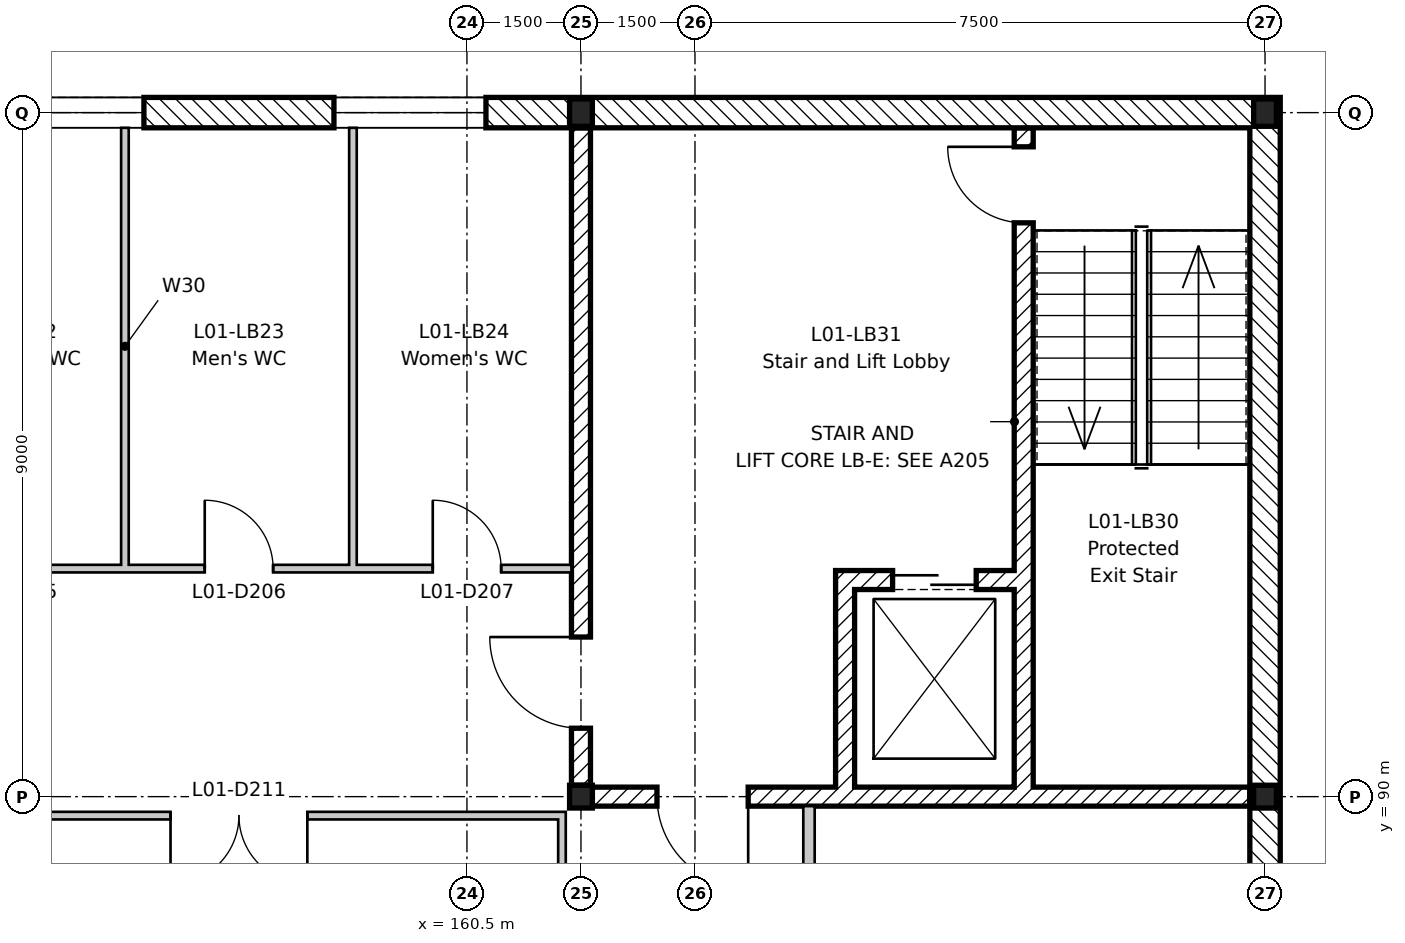
"""IFC4 building model, lengths in metres.
Left out: names, types, materials, properties, quantities, classifications, styles, units other than length and angle.
Written with IfcOpenShell. Run it as: python <this file> out.ifc"""

import sys

from ifc_helpers import new_model, si_unit, direction, frame, frame_2d, origin, origin_2d, place, context, subcontext, project, spatial, rectangle, i_section, extrude, element, fill, save


model = new_model("IFC4")
c1 = context("Model", 3, precision=1e-05, world=origin(), true_north=direction((0.0, 1.0)))
c2 = subcontext(c1, "Body", "Model", "MODEL_VIEW")
j1 = project(units=[si_unit("LENGTHUNIT", "METRE"), si_unit("PLANEANGLEUNIT", "RADIAN")], contexts=[c1])
p1 = place(None, origin())
s1 = spatial("IfcSite", under=j1, at=p1, CompositionType="ELEMENT")
p2 = place(p1, origin())
s2 = spatial("IfcBuilding", under=s1, at=p2, CompositionType="ELEMENT")
p3 = place(p2, frame((0.0, 0.0, 5.4)))
s3 = spatial("IfcBuildingStorey", under=s2, at=p3, CompositionType="ELEMENT", Elevation=5.4)
p4 = place(p3, frame((162.0, 90.0, -0.2), z_axis=(0.0, 0.0, 1.0), x_axis=(1.0, 0.0, 0.0)))
e1 = element("IfcColumn", 1, at=p4, inside=s3, PredefinedType="COLUMN", context=c2, shape_type="SweptSolid", body=[
    extrude(i_section(OverallWidth=0.3, OverallDepth=0.3, WebThickness=0.011, FlangeThickness=0.019, FilletRadius=0.027, at=origin_2d()), origin(), (0.0, 0.0, 1.0), 4.5),
])
p5 = place(p3, frame((162.0, 99.0, -0.2), z_axis=(0.0, 0.0, 1.0), x_axis=(1.0, 0.0, 0.0)))
e2 = element("IfcColumn", 2, at=p5, inside=s3, PredefinedType="COLUMN", context=c2, shape_type="SweptSolid", body=[
    extrude(i_section(OverallWidth=0.3, OverallDepth=0.36, WebThickness=0.012, FlangeThickness=0.022, FilletRadius=0.027, at=origin_2d()), origin(), (0.0, 0.0, 1.0), 4.5),
])
p6 = place(p3, frame((171.0, 90.0, -0.2), z_axis=(0.0, 0.0, 1.0), x_axis=(1.0, 0.0, 0.0)))
e3 = element("IfcColumn", 3, at=p6, inside=s3, PredefinedType="COLUMN", context=c2, shape_type="SweptSolid", body=[
    extrude(i_section(OverallWidth=0.3, OverallDepth=0.3, WebThickness=0.011, FlangeThickness=0.019, FilletRadius=0.027, at=origin_2d()), origin(), (0.0, 0.0, 1.0), 4.5),
])
p7 = place(p3, frame((171.0, 99.0, -0.2), z_axis=(0.0, 0.0, 1.0), x_axis=(1.0, 0.0, 0.0)))
e4 = element("IfcColumn", 4, at=p7, inside=s3, PredefinedType="COLUMN", context=c2, shape_type="SweptSolid", body=[
    extrude(i_section(OverallWidth=0.3, OverallDepth=0.36, WebThickness=0.012, FlangeThickness=0.022, FilletRadius=0.027, at=origin_2d()), origin(), (0.0, 0.0, 1.0), 4.5),
])
p8 = place(p3, frame((167.825, 98.8, 0.0), z_axis=(0.0, 0.0, 1.0), x_axis=(0.0, -1.0, 0.0)))
e5 = element("IfcWall", 5, at=p8, inside=s3, PredefinedType="SHEAR", context=c2, shape_type="SweptSolid", body=[
    extrude(rectangle(XDim=8.675, YDim=0.25, at=frame_2d((4.337, 0.0))), origin(), (0.0, 0.0, 1.0), 4.3),
])
p9 = place(p8, frame((0.25, 0.0, 0.0)))
e6 = element("IfcOpeningElement", 6, at=p9, cuts=e5, PredefinedType="OPENING", context=c2, shape_type="SweptSolid", body=[
    extrude(rectangle(XDim=1.0, YDim=2.1, at=frame_2d((0.5, 1.05))), frame((0.0, 0.135, 0.0), z_axis=(0.0, -1.0, 0.0), x_axis=(1.0, 0.0, 0.0)), (0.0, 0.0, 1.0), 0.27),
])
p10 = place(p3, frame((162.0, 98.8, 0.0), z_axis=(0.0, 0.0, 1.0), x_axis=(0.0, -1.0, 0.0)))
e7 = element("IfcWall", 7, at=p10, inside=s3, PredefinedType="SHEAR", context=c2, shape_type="SweptSolid", body=[
    extrude(rectangle(XDim=8.65, YDim=0.25, at=frame_2d((4.325, 0.0))), origin(), (0.0, 0.0, 1.0), 4.3),
])
p11 = place(p10, frame((6.7, 0.0, 0.0)))
e8 = element("IfcOpeningElement", 8, at=p11, cuts=e7, PredefinedType="OPENING", context=c2, shape_type="SweptSolid", body=[
    extrude(rectangle(XDim=1.2, YDim=2.1, at=frame_2d((0.6, 1.05))), frame((0.0, 0.135, 0.0), z_axis=(0.0, -1.0, 0.0), x_axis=(1.0, 0.0, 0.0)), (0.0, 0.0, 1.0), 0.27),
])
p12 = place(p3, frame((170.8, 90.0, 0.0), z_axis=(0.0, 0.0, 1.0), x_axis=(-1.0, 0.0, 0.0)))
e9 = element("IfcWall", 9, at=p12, inside=s3, PredefinedType="SHEAR", context=c2, shape_type="SweptSolid", body=[
    extrude(rectangle(XDim=8.65, YDim=0.25, at=frame_2d((4.325, 0.0))), origin(), (0.0, 0.0, 1.0), 4.3),
])
p13 = place(p12, frame((6.6, 0.0, 0.0)))
e10 = element("IfcOpeningElement", 10, at=p13, cuts=e9, PredefinedType="OPENING", context=c2, shape_type="SweptSolid", body=[
    extrude(rectangle(XDim=1.2, YDim=2.1, at=frame_2d((0.6, 1.05))), frame((0.0, 0.135, 0.0), z_axis=(0.0, -1.0, 0.0), x_axis=(1.0, 0.0, 0.0)), (0.0, 0.0, 1.0), 0.27),
])
p14 = place(p3, frame((167.7, 92.85, 0.0), z_axis=(0.0, 0.0, 1.0), x_axis=(-1.0, 0.0, 0.0)))
e11 = element("IfcWall", 11, at=p14, inside=s3, PredefinedType="SHEAR", context=c2, shape_type="SweptSolid", body=[
    extrude(rectangle(XDim=2.35, YDim=0.25, at=frame_2d((1.175, 0.0))), origin(), (0.0, 0.0, 1.0), 4.3),
])
p15 = place(p14, frame((0.5, 0.0, 0.0)))
e12 = element("IfcOpeningElement", 12, at=p15, cuts=e11, PredefinedType="OPENING", context=c2, shape_type="SweptSolid", body=[
    extrude(rectangle(XDim=1.1, YDim=2.1, at=frame_2d((0.55, 1.05))), frame((0.0, 0.135, 0.0), z_axis=(0.0, -1.0, 0.0), x_axis=(1.0, 0.0, 0.0)), (0.0, 0.0, 1.0), 0.27),
])
p16 = place(p3, frame((165.475, 92.725, 0.0), z_axis=(0.0, 0.0, 1.0), x_axis=(0.0, -1.0, 0.0)))
e13 = element("IfcWall", 13, at=p16, inside=s3, PredefinedType="SHEAR", context=c2, shape_type="SweptSolid", body=[
    extrude(rectangle(XDim=2.6, YDim=0.25, at=frame_2d((1.3, 0.0))), origin(), (0.0, 0.0, 1.0), 4.3),
])
p17 = place(p3, frame((116.8, 99.0, 0.0), z_axis=(0.0, 0.0, 1.0), x_axis=(1.0, 0.0, 0.0)))
e14 = element("IfcWall", 14, at=p17, inside=s3, PredefinedType="STANDARD", context=c2, shape_type="SweptSolid", body=[
    extrude(rectangle(XDim=54.4, YDim=0.4, at=frame_2d((27.2, 0.0))), origin(), (0.0, 0.0, 1.0), 4.3),
])
p18 = place(p17, frame((1.45, 0.0, 0.5)))
e15 = element("IfcOpeningElement", 15, at=p18, cuts=e14, PredefinedType="OPENING", context=c2, shape_type="SweptSolid", body=[
    extrude(rectangle(XDim=2.0, YDim=3.2, at=frame_2d((1.0, 1.6))), frame((0.0, 0.21, 0.0), z_axis=(0.0, -1.0, 0.0), x_axis=(1.0, 0.0, 0.0)), (0.0, 0.0, 1.0), 0.42),
])
p19 = place(p17, frame((5.95, 0.0, 0.5)))
e16 = element("IfcOpeningElement", 16, at=p19, cuts=e14, PredefinedType="OPENING", context=c2, shape_type="SweptSolid", body=[
    extrude(rectangle(XDim=2.0, YDim=3.2, at=frame_2d((1.0, 1.6))), frame((0.0, 0.21, 0.0), z_axis=(0.0, -1.0, 0.0), x_axis=(1.0, 0.0, 0.0)), (0.0, 0.0, 1.0), 0.42),
])
p20 = place(p17, frame((10.45, 0.0, 0.5)))
e17 = element("IfcOpeningElement", 17, at=p20, cuts=e14, PredefinedType="OPENING", context=c2, shape_type="SweptSolid", body=[
    extrude(rectangle(XDim=2.0, YDim=3.2, at=frame_2d((1.0, 1.6))), frame((0.0, 0.21, 0.0), z_axis=(0.0, -1.0, 0.0), x_axis=(1.0, 0.0, 0.0)), (0.0, 0.0, 1.0), 0.42),
])
p21 = place(p17, frame((14.95, 0.0, 0.5)))
e18 = element("IfcOpeningElement", 18, at=p21, cuts=e14, PredefinedType="OPENING", context=c2, shape_type="SweptSolid", body=[
    extrude(rectangle(XDim=2.0, YDim=3.2, at=frame_2d((1.0, 1.6))), frame((0.0, 0.21, 0.0), z_axis=(0.0, -1.0, 0.0), x_axis=(1.0, 0.0, 0.0)), (0.0, 0.0, 1.0), 0.42),
])
p22 = place(p17, frame((28.45, 0.0, 0.5)))
e19 = element("IfcOpeningElement", 19, at=p22, cuts=e14, PredefinedType="OPENING", context=c2, shape_type="SweptSolid", body=[
    extrude(rectangle(XDim=2.0, YDim=3.2, at=frame_2d((1.0, 1.6))), frame((0.0, 0.21, 0.0), z_axis=(0.0, -1.0, 0.0), x_axis=(1.0, 0.0, 0.0)), (0.0, 0.0, 1.0), 0.42),
])
p23 = place(p17, frame((32.95, 0.0, 0.5)))
e20 = element("IfcOpeningElement", 20, at=p23, cuts=e14, PredefinedType="OPENING", context=c2, shape_type="SweptSolid", body=[
    extrude(rectangle(XDim=2.0, YDim=3.2, at=frame_2d((1.0, 1.6))), frame((0.0, 0.21, 0.0), z_axis=(0.0, -1.0, 0.0), x_axis=(1.0, 0.0, 0.0)), (0.0, 0.0, 1.0), 0.42),
])
p24 = place(p17, frame((37.45, 0.0, 0.5)))
e21 = element("IfcOpeningElement", 21, at=p24, cuts=e14, PredefinedType="OPENING", context=c2, shape_type="SweptSolid", body=[
    extrude(rectangle(XDim=2.0, YDim=3.2, at=frame_2d((1.0, 1.6))), frame((0.0, 0.21, 0.0), z_axis=(0.0, -1.0, 0.0), x_axis=(1.0, 0.0, 0.0)), (0.0, 0.0, 1.0), 0.42),
])
p25 = place(p17, frame((41.95, 0.0, 0.5)))
e22 = element("IfcOpeningElement", 22, at=p25, cuts=e14, PredefinedType="OPENING", context=c2, shape_type="SweptSolid", body=[
    extrude(rectangle(XDim=2.0, YDim=3.2, at=frame_2d((1.0, 1.6))), frame((0.0, 0.21, 0.0), z_axis=(0.0, -1.0, 0.0), x_axis=(1.0, 0.0, 0.0)), (0.0, 0.0, 1.0), 0.42),
])
p26 = place(p17, frame((19.55, 0.0, 0.0)))
e23 = element("IfcOpeningElement", 23, at=p26, cuts=e14, PredefinedType="OPENING", context=c2, shape_type="SweptSolid", body=[
    extrude(rectangle(XDim=1.8, YDim=2.4, at=frame_2d((0.9, 1.2))), frame((0.0, 0.21, 0.0), z_axis=(0.0, -1.0, 0.0), x_axis=(1.0, 0.0, 0.0)), (0.0, 0.0, 1.0), 0.42),
])
p27 = place(p17, frame((24.05, 0.0, 0.0)))
e24 = element("IfcOpeningElement", 24, at=p27, cuts=e14, PredefinedType="OPENING", context=c2, shape_type="SweptSolid", body=[
    extrude(rectangle(XDim=1.8, YDim=2.4, at=frame_2d((0.9, 1.2))), frame((0.0, 0.21, 0.0), z_axis=(0.0, -1.0, 0.0), x_axis=(1.0, 0.0, 0.0)), (0.0, 0.0, 1.0), 0.42),
])
p28 = place(p3, frame((171.0, 63.2, 0.0), z_axis=(0.0, 0.0, 1.0), x_axis=(0.0, 1.0, 0.0)))
e25 = element("IfcWall", 25, at=p28, inside=s3, PredefinedType="STANDARD", context=c2, shape_type="SweptSolid", body=[
    extrude(rectangle(XDim=35.6, YDim=0.4, at=frame_2d((17.8, 0.0))), origin(), (0.0, 0.0, 1.0), 4.3),
])
p29 = place(p28, frame((1.05, 0.0, 0.5)))
e26 = element("IfcOpeningElement", 26, at=p29, cuts=e25, PredefinedType="OPENING", context=c2, shape_type="SweptSolid", body=[
    extrude(rectangle(XDim=2.0, YDim=3.2, at=frame_2d((1.0, 1.6))), frame((0.0, 0.21, 0.0), z_axis=(0.0, -1.0, 0.0), x_axis=(1.0, 0.0, 0.0)), (0.0, 0.0, 1.0), 0.42),
])
p30 = place(p28, frame((5.55, 0.0, 0.5)))
e27 = element("IfcOpeningElement", 27, at=p30, cuts=e25, PredefinedType="OPENING", context=c2, shape_type="SweptSolid", body=[
    extrude(rectangle(XDim=2.0, YDim=3.2, at=frame_2d((1.0, 1.6))), frame((0.0, 0.21, 0.0), z_axis=(0.0, -1.0, 0.0), x_axis=(1.0, 0.0, 0.0)), (0.0, 0.0, 1.0), 0.42),
])
p31 = place(p28, frame((19.05, 0.0, 0.5)))
e28 = element("IfcOpeningElement", 28, at=p31, cuts=e25, PredefinedType="OPENING", context=c2, shape_type="SweptSolid", body=[
    extrude(rectangle(XDim=2.0, YDim=3.2, at=frame_2d((1.0, 1.6))), frame((0.0, 0.21, 0.0), z_axis=(0.0, -1.0, 0.0), x_axis=(1.0, 0.0, 0.0)), (0.0, 0.0, 1.0), 0.42),
])
p32 = place(p28, frame((23.55, 0.0, 0.5)))
e29 = element("IfcOpeningElement", 29, at=p32, cuts=e25, PredefinedType="OPENING", context=c2, shape_type="SweptSolid", body=[
    extrude(rectangle(XDim=2.0, YDim=3.2, at=frame_2d((1.0, 1.6))), frame((0.0, 0.21, 0.0), z_axis=(0.0, -1.0, 0.0), x_axis=(1.0, 0.0, 0.0)), (0.0, 0.0, 1.0), 0.42),
])
p33 = place(p28, frame((10.15, 0.0, 0.0)))
e30 = element("IfcOpeningElement", 30, at=p33, cuts=e25, PredefinedType="OPENING", context=c2, shape_type="SweptSolid", body=[
    extrude(rectangle(XDim=1.8, YDim=2.4, at=frame_2d((0.9, 1.2))), frame((0.0, 0.21, 0.0), z_axis=(0.0, -1.0, 0.0), x_axis=(1.0, 0.0, 0.0)), (0.0, 0.0, 1.0), 0.42),
])
p34 = place(p28, frame((14.65, 0.0, 0.0)))
e31 = element("IfcOpeningElement", 31, at=p34, cuts=e25, PredefinedType="OPENING", context=c2, shape_type="SweptSolid", body=[
    extrude(rectangle(XDim=1.8, YDim=2.4, at=frame_2d((0.9, 1.2))), frame((0.0, 0.21, 0.0), z_axis=(0.0, -1.0, 0.0), x_axis=(1.0, 0.0, 0.0)), (0.0, 0.0, 1.0), 0.42),
])
p35 = place(p3, frame((147.0, 93.0, 0.0), z_axis=(0.0, 0.0, 1.0), x_axis=(1.0, 0.0, 0.0)))
e32 = element("IfcWall", 32, at=p35, inside=s3, PredefinedType="PARTITIONING", context=c2, shape_type="SweptSolid", body=[
    extrude(rectangle(XDim=14.875, YDim=0.1, at=frame_2d((7.438, 0.0))), origin(), (0.0, 0.0, 1.0), 3.78),
])
p36 = place(p35, frame((2.5, 0.0, 0.0)))
e33 = element("IfcOpeningElement", 33, at=p36, cuts=e32, PredefinedType="OPENING", context=c2, shape_type="SweptSolid", body=[
    extrude(rectangle(XDim=1.0, YDim=2.1, at=frame_2d((0.5, 1.05))), frame((0.0, 0.06, 0.0), z_axis=(0.0, -1.0, 0.0), x_axis=(1.0, 0.0, 0.0)), (0.0, 0.0, 1.0), 0.12),
])
p37 = place(p35, frame((7.0, 0.0, 0.0)))
e34 = element("IfcOpeningElement", 34, at=p37, cuts=e32, PredefinedType="OPENING", context=c2, shape_type="SweptSolid", body=[
    extrude(rectangle(XDim=1.0, YDim=2.1, at=frame_2d((0.5, 1.05))), frame((0.0, 0.06, 0.0), z_axis=(0.0, -1.0, 0.0), x_axis=(1.0, 0.0, 0.0)), (0.0, 0.0, 1.0), 0.12),
])
p38 = place(p35, frame((10.05, 0.0, 0.0)))
e35 = element("IfcOpeningElement", 35, at=p38, cuts=e32, PredefinedType="OPENING", context=c2, shape_type="SweptSolid", body=[
    extrude(rectangle(XDim=0.9, YDim=2.1, at=frame_2d((0.45, 1.05))), frame((0.0, 0.06, 0.0), z_axis=(0.0, -1.0, 0.0), x_axis=(1.0, 0.0, 0.0)), (0.0, 0.0, 1.0), 0.12),
])
p39 = place(p35, frame((13.05, 0.0, 0.0)))
e36 = element("IfcOpeningElement", 36, at=p39, cuts=e32, PredefinedType="OPENING", context=c2, shape_type="SweptSolid", body=[
    extrude(rectangle(XDim=0.9, YDim=2.1, at=frame_2d((0.45, 1.05))), frame((0.0, 0.06, 0.0), z_axis=(0.0, -1.0, 0.0), x_axis=(1.0, 0.0, 0.0)), (0.0, 0.0, 1.0), 0.12),
])
for number, where, z_axis, x_axis in (
    (37, (156.0, 93.05, 0.0), (0.0, 0.0, 1.0), (0.0, 1.0, 0.0)),
    (38, (159.0, 93.05, 0.0), (0.0, 0.0, 1.0), (0.0, 1.0, 0.0)),
):
    element("IfcWall", number, at=place(p3, frame(where, z_axis=z_axis, x_axis=x_axis)), inside=s3, PredefinedType="PARTITIONING", context=c2, shape_type="SweptSolid", body=[
        extrude(rectangle(XDim=5.75, YDim=0.1, at=frame_2d((2.875, 0.0))), origin(), (0.0, 0.0, 1.0), 3.78),
    ])
p40 = place(p3, frame((165.0, 69.075, 0.0), z_axis=(0.0, 0.0, 1.0), x_axis=(0.0, 1.0, 0.0)))
e39 = element("IfcWall", 39, at=p40, inside=s3, PredefinedType="PARTITIONING", context=c2, shape_type="SweptSolid", body=[
    extrude(rectangle(XDim=20.8, YDim=0.15, at=frame_2d((10.4, 0.0))), origin(), (0.0, 0.0, 1.0), 3.78),
])
p41 = place(p40, frame((0.825, 0.0, 0.0)))
e40 = element("IfcOpeningElement", 40, at=p41, cuts=e39, PredefinedType="OPENING", context=c2, shape_type="SweptSolid", body=[
    extrude(rectangle(XDim=1.2, YDim=2.1, at=frame_2d((0.6, 1.05))), frame((0.0, 0.085, 0.0), z_axis=(0.0, -1.0, 0.0), x_axis=(1.0, 0.0, 0.0)), (0.0, 0.0, 1.0), 0.17),
])
p42 = place(p40, frame((5.425, 0.0, 0.0)))
e41 = element("IfcOpeningElement", 41, at=p42, cuts=e39, PredefinedType="OPENING", context=c2, shape_type="SweptSolid", body=[
    extrude(rectangle(XDim=1.0, YDim=2.1, at=frame_2d((0.5, 1.05))), frame((0.0, 0.085, 0.0), z_axis=(0.0, -1.0, 0.0), x_axis=(1.0, 0.0, 0.0)), (0.0, 0.0, 1.0), 0.17),
])
p43 = place(p40, frame((14.325, 0.0, 0.0)))
e42 = element("IfcOpeningElement", 42, at=p43, cuts=e39, PredefinedType="OPENING", context=c2, shape_type="SweptSolid", body=[
    extrude(rectangle(XDim=1.2, YDim=2.1, at=frame_2d((0.6, 1.05))), frame((0.0, 0.085, 0.0), z_axis=(0.0, -1.0, 0.0), x_axis=(1.0, 0.0, 0.0)), (0.0, 0.0, 1.0), 0.17),
])
p44 = place(p3, frame((126.2, 89.75, 0.0), z_axis=(0.0, 0.0, 1.0), x_axis=(1.0, 0.0, 0.0)))
e43 = element("IfcWall", 43, at=p44, inside=s3, PredefinedType="PARTITIONING", context=c2, shape_type="SweptSolid", body=[
    extrude(rectangle(XDim=35.6, YDim=0.1, at=frame_2d((17.8, 0.0))), origin(), (0.0, 0.0, 1.0), 4.3),
])
p45 = place(p44, frame((21.4, 0.0, 0.0)))
e44 = element("IfcOpeningElement", 44, at=p45, cuts=e43, PredefinedType="OPENING", context=c2, shape_type="SweptSolid", body=[
    extrude(rectangle(XDim=1.8, YDim=2.1, at=frame_2d((0.9, 1.05))), frame((0.0, 0.06, 0.0), z_axis=(0.0, -1.0, 0.0), x_axis=(1.0, 0.0, 0.0)), (0.0, 0.0, 1.0), 0.12),
])
p46 = place(p44, frame((30.4, 0.0, 0.0)))
e45 = element("IfcOpeningElement", 45, at=p46, cuts=e43, PredefinedType="OPENING", context=c2, shape_type="SweptSolid", body=[
    extrude(rectangle(XDim=1.8, YDim=2.1, at=frame_2d((0.9, 1.05))), frame((0.0, 0.06, 0.0), z_axis=(0.0, -1.0, 0.0), x_axis=(1.0, 0.0, 0.0)), (0.0, 0.0, 1.0), 0.12),
])
p47 = place(p3, frame((161.75, 72.3, 0.0), z_axis=(0.0, 0.0, 1.0), x_axis=(0.0, 1.0, 0.0)))
e46 = element("IfcWall", 46, at=p47, inside=s3, PredefinedType="PARTITIONING", context=c2, shape_type="SweptSolid", body=[
    extrude(rectangle(XDim=17.4, YDim=0.1, at=frame_2d((8.7, 0.0))), origin(), (0.0, 0.0, 1.0), 4.3),
])
p48 = place(p47, frame((12.3, 0.0, 0.0)))
e47 = element("IfcOpeningElement", 47, at=p48, cuts=e46, PredefinedType="OPENING", context=c2, shape_type="SweptSolid", body=[
    extrude(rectangle(XDim=1.8, YDim=2.1, at=frame_2d((0.9, 1.05))), frame((0.0, 0.06, 0.0), z_axis=(0.0, -1.0, 0.0), x_axis=(1.0, 0.0, 0.0)), (0.0, 0.0, 1.0), 0.12),
])
p49 = place(p24, origin())
e48 = element("IfcWindow", 48, at=p49, inside=s3, PartitioningType="SINGLE_PANEL", PredefinedType="WINDOW", context=c2, shape_type="SweptSolid", body=[
    extrude(rectangle(XDim=2.0, YDim=3.2, at=frame_2d((1.0, 1.6))), frame((0.0, 0.03, 0.0), z_axis=(0.0, -1.0, 0.0), x_axis=(1.0, 0.0, 0.0)), (0.0, 0.0, 1.0), 0.06),
])
fill(e21, e48)
p50 = place(p25, origin())
e49 = element("IfcWindow", 49, at=p50, inside=s3, PartitioningType="SINGLE_PANEL", PredefinedType="WINDOW", context=c2, shape_type="SweptSolid", body=[
    extrude(rectangle(XDim=2.0, YDim=3.2, at=frame_2d((1.0, 1.6))), frame((0.0, 0.03, 0.0), z_axis=(0.0, -1.0, 0.0), x_axis=(1.0, 0.0, 0.0)), (0.0, 0.0, 1.0), 0.06),
])
fill(e22, e49)
p51 = place(p38, origin())
e50 = element("IfcDoor", 50, at=p51, inside=s3, OperationType="SINGLE_SWING_LEFT", PredefinedType="DOOR", context=c2, shape_type="SweptSolid", body=[
    extrude(rectangle(XDim=0.9, YDim=2.1, at=frame_2d((0.45, 1.05))), frame((0.0, 0.025, 0.0), z_axis=(0.0, -1.0, 0.0), x_axis=(1.0, 0.0, 0.0)), (0.0, 0.0, 1.0), 0.05),
])
fill(e35, e50)
p52 = place(p39, origin())
e51 = element("IfcDoor", 51, at=p52, inside=s3, OperationType="SINGLE_SWING_LEFT", PredefinedType="DOOR", context=c2, shape_type="SweptSolid", body=[
    extrude(rectangle(XDim=0.9, YDim=2.1, at=frame_2d((0.45, 1.05))), frame((0.0, 0.025, 0.0), z_axis=(0.0, -1.0, 0.0), x_axis=(1.0, 0.0, 0.0)), (0.0, 0.0, 1.0), 0.05),
])
fill(e36, e51)
p53 = place(p46, frame((1.8, 0.0, 0.0), z_axis=(0.0, 0.0, 1.0), x_axis=(-1.0, 0.0, 0.0)))
e52 = element("IfcDoor", 52, at=p53, inside=s3, OperationType="DOUBLE_DOOR_SINGLE_SWING", PredefinedType="DOOR", context=c2, shape_type="SweptSolid", body=[
    extrude(rectangle(XDim=1.8, YDim=2.1, at=frame_2d((0.9, 1.05))), frame((0.0, 0.025, 0.0), z_axis=(0.0, -1.0, 0.0), x_axis=(1.0, 0.0, 0.0)), (0.0, 0.0, 1.0), 0.05),
])
fill(e45, e52)
p54 = place(p9, frame((1.0, 0.0, 0.0), z_axis=(0.0, 0.0, 1.0), x_axis=(-1.0, 0.0, 0.0)))
e53 = element("IfcDoor", 53, at=p54, inside=s3, OperationType="SINGLE_SWING_RIGHT", PredefinedType="DOOR", context=c2, shape_type="SweptSolid", body=[
    extrude(rectangle(XDim=1.0, YDim=2.1, at=frame_2d((0.5, 1.05))), frame((0.0, 0.025, 0.0), z_axis=(0.0, -1.0, 0.0), x_axis=(1.0, 0.0, 0.0)), (0.0, 0.0, 1.0), 0.05),
])
fill(e6, e53)
p55 = place(p15, origin())
e54 = element("IfcDoor", 54, at=p55, inside=s3, OperationType="SLIDING_TO_LEFT", PredefinedType="DOOR", context=c2, shape_type="SweptSolid", body=[
    extrude(rectangle(XDim=1.1, YDim=2.1, at=frame_2d((0.55, 1.05))), frame((0.0, 0.025, 0.0), z_axis=(0.0, -1.0, 0.0), x_axis=(1.0, 0.0, 0.0)), (0.0, 0.0, 1.0), 0.05),
])
fill(e12, e54)
p56 = place(p13, origin())
e55 = element("IfcDoor", 55, at=p56, inside=s3, OperationType="SINGLE_SWING_LEFT", PredefinedType="DOOR", context=c2, shape_type="SweptSolid", body=[
    extrude(rectangle(XDim=1.2, YDim=2.1, at=frame_2d((0.6, 1.05))), frame((0.0, 0.025, 0.0), z_axis=(0.0, -1.0, 0.0), x_axis=(1.0, 0.0, 0.0)), (0.0, 0.0, 1.0), 0.05),
])
fill(e10, e55)
p57 = place(p11, frame((1.2, 0.0, 0.0), z_axis=(0.0, 0.0, 1.0), x_axis=(-1.0, 0.0, 0.0)))
e56 = element("IfcDoor", 56, at=p57, inside=s3, OperationType="SINGLE_SWING_RIGHT", PredefinedType="DOOR", context=c2, shape_type="SweptSolid", body=[
    extrude(rectangle(XDim=1.2, YDim=2.1, at=frame_2d((0.6, 1.05))), frame((0.0, 0.025, 0.0), z_axis=(0.0, -1.0, 0.0), x_axis=(1.0, 0.0, 0.0)), (0.0, 0.0, 1.0), 0.05),
])
fill(e8, e56)
save(model, sys.argv[1])
